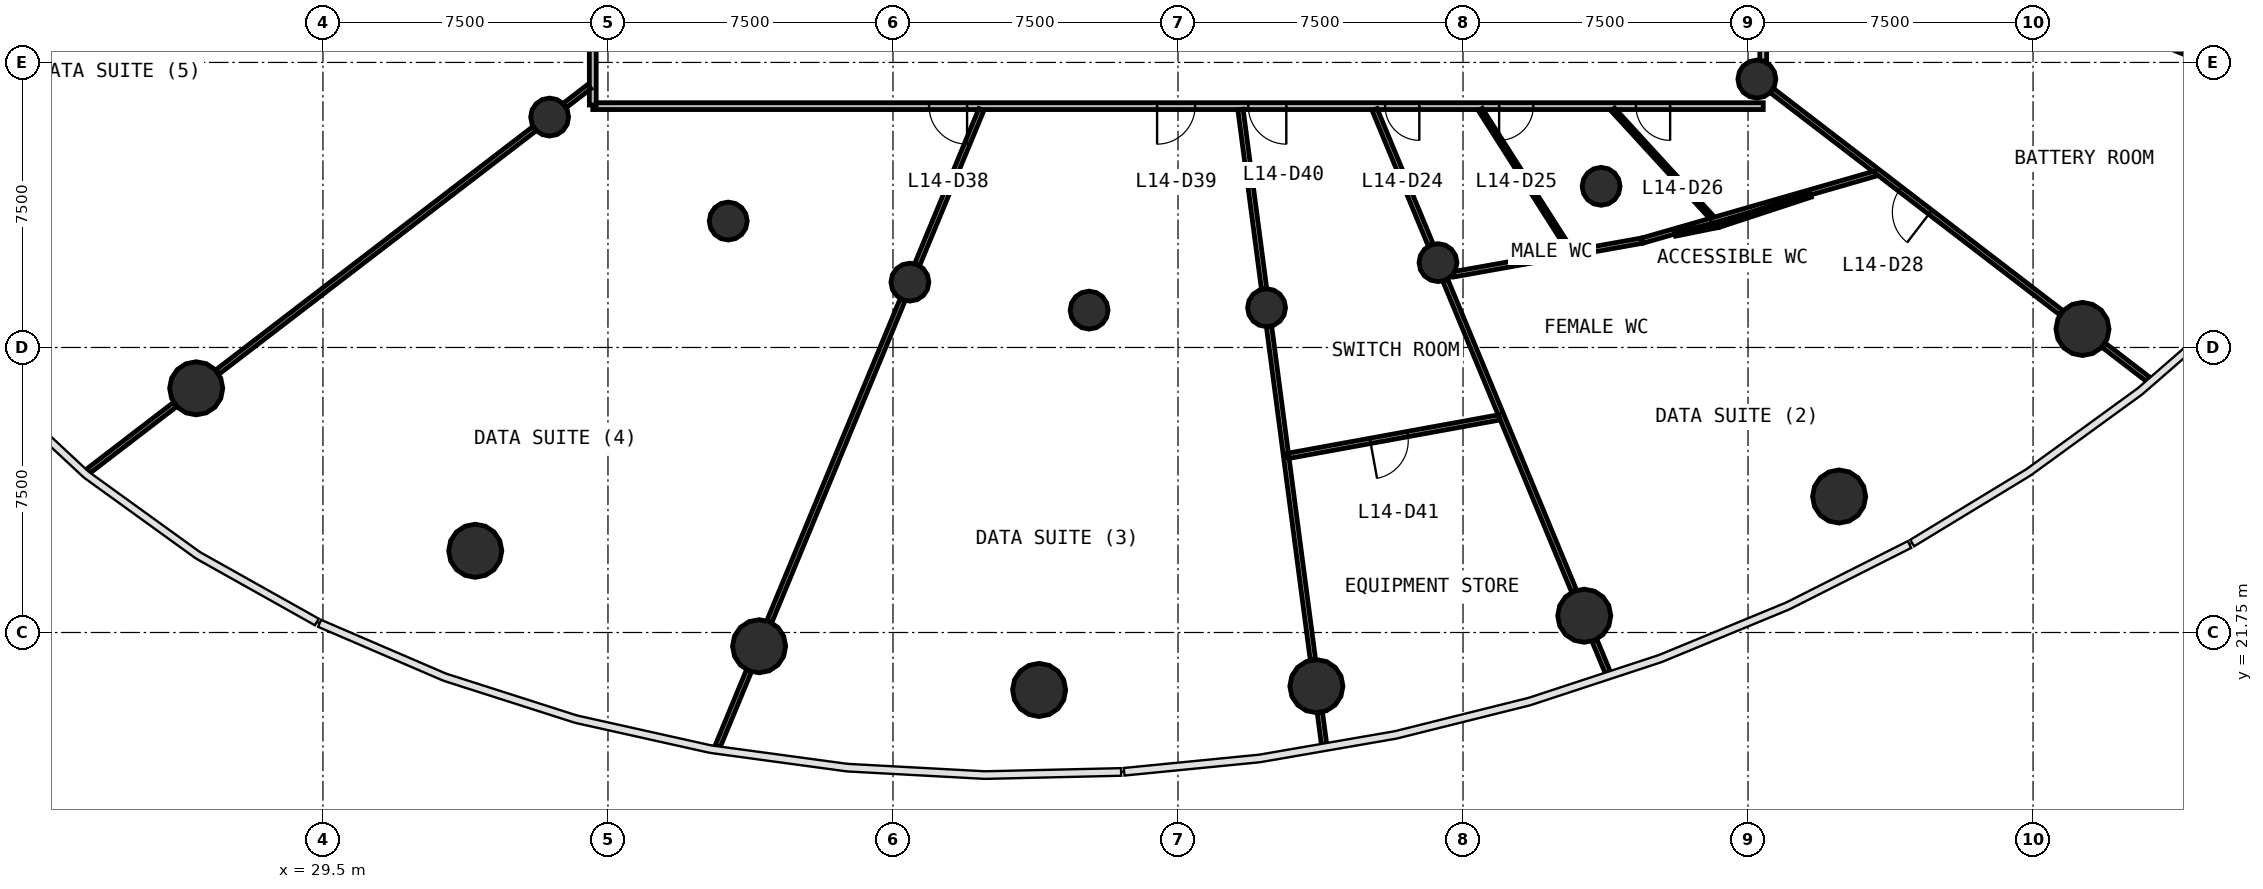
"""IFC4 building model, lengths in metres.
Left out: names, types, materials, properties, quantities, classifications, styles, units other than length and angle.
Written with IfcOpenShell. Run it as: python <this file> out.ifc"""

import sys

from ifc_helpers import new_model, si_unit, direction, frame, frame_2d, origin, origin_2d, place, context, subcontext, project, spatial, rectangle, circle, extrude, source, transform, mapped, element, fill, save


model = new_model("IFC4")
c1 = context("Model", 3, precision=1e-05, world=origin(), true_north=direction((0.0, 1.0)))
c2 = subcontext(c1, "Body", "Model", "MODEL_VIEW")
j1 = project(units=[si_unit("LENGTHUNIT", "METRE"), si_unit("PLANEANGLEUNIT", "RADIAN")], contexts=[c1])
p1 = place(None, origin())
s1 = spatial("IfcSite", under=j1, at=p1, CompositionType="ELEMENT")
p2 = place(p1, origin())
s2 = spatial("IfcBuilding", under=s1, at=p2, CompositionType="ELEMENT")
p3 = place(p2, frame((0.0, 0.0, 62.2)))
s3 = spatial("IfcBuildingStorey", under=s2, at=p3, CompositionType="ELEMENT", Elevation=62.2)
m1 = source(origin(), c2, "Body", "SweptSolid", [
    extrude(circle(Radius=0.7, at=origin_2d()), origin(), (0.0, 0.0, 1.0), 4.4),
])
for number, where, z_axis, x_axis in (
    (1, (26.164, 28.176, 0.0), (0.0, 0.0, 1.0), (1.0, 0.0, 0.0)),
    (2, (33.508, 23.9, 0.0), (0.0, 0.0, 1.0), (1.0, 0.0, 0.0)),
    (3, (40.977, 21.389, 0.0), (0.0, 0.0, 1.0), (1.0, 0.0, 0.0)),
    (4, (48.345, 20.239, 0.0), (0.0, 0.0, 1.0), (1.0, 0.0, 0.0)),
    (5, (55.642, 20.339, 0.0), (0.0, 0.0, 1.0), (1.0, 0.0, 0.0)),
    (6, (62.69, 22.191, 0.0), (0.0, 0.0, 1.0), (1.0, 0.0, 0.0)),
    (7, (69.396, 25.328, 0.0), (0.0, 0.0, 1.0), (1.0, 0.0, 0.0)),
    (8, (75.801, 29.737, 0.0), (0.0, 0.0, 1.0), (1.0, 0.0, 0.0)),
):
    element("IfcColumn", number, at=place(p3, frame(where, z_axis=z_axis, x_axis=x_axis)), inside=s3, PredefinedType="COLUMN", context=c2, shape_type="MappedRepresentation", body=[
        mapped(m1, transform((0.0, 0.0, 0.0), scale=1.0)),
    ])
m2 = source(origin(), c2, "Body", "SweptSolid", [
    extrude(circle(Radius=0.5, at=origin_2d()), origin(), (0.0, 0.0, 1.0), 4.4),
])
for number, where, z_axis, x_axis in (
    (9, (35.465, 35.312, 0.0), (0.0, 0.0, 1.0), (1.0, 0.0, 0.0)),
    (10, (40.165, 32.576, 0.0), (0.0, 0.0, 1.0), (1.0, 0.0, 0.0)),
    (11, (44.945, 30.969, 0.0), (0.0, 0.0, 1.0), (1.0, 0.0, 0.0)),
    (12, (49.661, 30.233, 0.0), (0.0, 0.0, 1.0), (1.0, 0.0, 0.0)),
    (13, (54.331, 30.297, 0.0), (0.0, 0.0, 1.0), (1.0, 0.0, 0.0)),
    (14, (58.842, 31.482, 0.0), (0.0, 0.0, 1.0), (1.0, 0.0, 0.0)),
    (15, (63.134, 33.49, 0.0), (0.0, 0.0, 1.0), (1.0, 0.0, 0.0)),
    (16, (67.232, 36.312, 0.0), (0.0, 0.0, 1.0), (1.0, 0.0, 0.0)),
):
    element("IfcColumn", number, at=place(p3, frame(where, z_axis=z_axis, x_axis=x_axis)), inside=s3, PredefinedType="COLUMN", context=c2, shape_type="MappedRepresentation", body=[
        mapped(m2, transform((0.0, 0.0, 0.0), scale=1.0)),
    ])
p4 = place(p3, frame((67.4, 35.6, 0.0), z_axis=(0.0, 0.0, 1.0), x_axis=(-1.0, 0.0, 0.0)))
e17 = element("IfcWall", 17, at=p4, inside=s3, PredefinedType="PARTITIONING", context=c2, shape_type="SweptSolid", body=[
    extrude(rectangle(XDim=30.8, YDim=0.18, at=frame_2d((15.4, 0.0))), origin(), (0.0, 0.0, 1.0), 3.05),
])
p5 = place(p4, frame((9.05, 0.0, 0.0)))
e18 = element("IfcOpeningElement", 18, at=p5, cuts=e17, PredefinedType="OPENING", context=c2, shape_type="SweptSolid", body=[
    extrude(rectangle(XDim=0.9, YDim=2.1, at=frame_2d((0.45, 1.05))), frame((0.0, 0.1, 0.0), z_axis=(0.0, -1.0, 0.0), x_axis=(1.0, 0.0, 0.0)), (0.0, 0.0, 1.0), 0.2),
])
p6 = place(p4, frame((6.05, 0.0, 0.0)))
e19 = element("IfcOpeningElement", 19, at=p6, cuts=e17, PredefinedType="OPENING", context=c2, shape_type="SweptSolid", body=[
    extrude(rectangle(XDim=0.9, YDim=2.1, at=frame_2d((0.45, 1.05))), frame((0.0, 0.1, 0.0), z_axis=(0.0, -1.0, 0.0), x_axis=(1.0, 0.0, 0.0)), (0.0, 0.0, 1.0), 0.2),
])
p7 = place(p4, frame((2.45, 0.0, 0.0)))
e20 = element("IfcOpeningElement", 20, at=p7, cuts=e17, PredefinedType="OPENING", context=c2, shape_type="SweptSolid", body=[
    extrude(rectangle(XDim=0.9, YDim=2.1, at=frame_2d((0.45, 1.05))), frame((0.0, 0.1, 0.0), z_axis=(0.0, -1.0, 0.0), x_axis=(1.0, 0.0, 0.0)), (0.0, 0.0, 1.0), 0.2),
])
p8 = place(p4, frame((20.95, 0.0, 0.0)))
e21 = element("IfcOpeningElement", 21, at=p8, cuts=e17, PredefinedType="OPENING", context=c2, shape_type="SweptSolid", body=[
    extrude(rectangle(XDim=1.0, YDim=2.1, at=frame_2d((0.5, 1.05))), frame((0.0, 0.1, 0.0), z_axis=(0.0, -1.0, 0.0), x_axis=(1.0, 0.0, 0.0)), (0.0, 0.0, 1.0), 0.2),
])
p9 = place(p4, frame((14.95, 0.0, 0.0)))
e22 = element("IfcOpeningElement", 22, at=p9, cuts=e17, PredefinedType="OPENING", context=c2, shape_type="SweptSolid", body=[
    extrude(rectangle(XDim=1.0, YDim=2.1, at=frame_2d((0.5, 1.05))), frame((0.0, 0.1, 0.0), z_axis=(0.0, -1.0, 0.0), x_axis=(1.0, 0.0, 0.0)), (0.0, 0.0, 1.0), 0.2),
])
p10 = place(p4, frame((12.55, 0.0, 0.0)))
e23 = element("IfcOpeningElement", 23, at=p10, cuts=e17, PredefinedType="OPENING", context=c2, shape_type="SweptSolid", body=[
    extrude(rectangle(XDim=1.0, YDim=2.1, at=frame_2d((0.5, 1.05))), frame((0.0, 0.1, 0.0), z_axis=(0.0, -1.0, 0.0), x_axis=(1.0, 0.0, 0.0)), (0.0, 0.0, 1.0), 0.2),
])
p11 = place(p3, frame((67.4, 60.37, 0.0), z_axis=(0.0, 0.0, 1.0), x_axis=(0.0, -1.0, 0.0)))
e24 = element("IfcWall", 24, at=p11, inside=s3, PredefinedType="PARTITIONING", context=c2, shape_type="SweptSolid", body=[
    extrude(rectangle(XDim=23.583, YDim=0.18, at=frame_2d((11.791, 0.0))), origin(), (0.0, 0.0, 1.0), 3.05),
])
p12 = place(p11, frame((19.133, 0.0, 0.0)))
e25 = element("IfcOpeningElement", 25, at=p12, cuts=e24, PredefinedType="OPENING", context=c2, shape_type="SweptSolid", body=[
    extrude(rectangle(XDim=1.0, YDim=2.1, at=frame_2d((0.5, 1.05))), frame((0.0, 0.1, 0.0), z_axis=(0.0, -1.0, 0.0), x_axis=(1.0, 0.0, 0.0)), (0.0, 0.0, 1.0), 0.2),
])
p13 = place(p11, frame((11.333, 0.0, 0.0)))
e26 = element("IfcOpeningElement", 26, at=p13, cuts=e24, PredefinedType="OPENING", context=c2, shape_type="SweptSolid", body=[
    extrude(rectangle(XDim=1.0, YDim=2.1, at=frame_2d((0.5, 1.05))), frame((0.0, 0.1, 0.0), z_axis=(0.0, -1.0, 0.0), x_axis=(1.0, 0.0, 0.0)), (0.0, 0.0, 1.0), 0.2),
])
p14 = place(p3, frame((36.6, 35.63, 0.0), z_axis=(0.0, 0.0, 1.0), x_axis=(0.0, 1.0, 0.0)))
e27 = element("IfcWall", 27, at=p14, inside=s3, PredefinedType="PARTITIONING", context=c2, shape_type="SweptSolid", body=[
    extrude(rectangle(XDim=23.583, YDim=0.18, at=frame_2d((11.791, 0.0))), origin(), (0.0, 0.0, 1.0), 3.05),
])
p15 = place(p14, frame((14.732, 0.0, 0.0)))
e28 = element("IfcOpeningElement", 28, at=p15, cuts=e27, PredefinedType="OPENING", context=c2, shape_type="SweptSolid", body=[
    extrude(rectangle(XDim=1.0, YDim=2.1, at=frame_2d((0.5, 1.05))), frame((0.0, 0.1, 0.0), z_axis=(0.0, -1.0, 0.0), x_axis=(1.0, 0.0, 0.0)), (0.0, 0.0, 1.0), 0.2),
])
p16 = place(p14, frame((11.333, 0.0, 0.0)))
e29 = element("IfcOpeningElement", 29, at=p16, cuts=e27, PredefinedType="OPENING", context=c2, shape_type="SweptSolid", body=[
    extrude(rectangle(XDim=1.0, YDim=2.1, at=frame_2d((0.5, 1.05))), frame((0.0, 0.1, 0.0), z_axis=(0.0, -1.0, 0.0), x_axis=(1.0, 0.0, 0.0)), (0.0, 0.0, 1.0), 0.2),
])
p17 = place(p14, frame((9.133, 0.0, 0.0)))
e30 = element("IfcOpeningElement", 30, at=p17, cuts=e27, PredefinedType="OPENING", context=c2, shape_type="SweptSolid", body=[
    extrude(rectangle(XDim=1.0, YDim=2.1, at=frame_2d((0.5, 1.05))), frame((0.0, 0.1, 0.0), z_axis=(0.0, -1.0, 0.0), x_axis=(1.0, 0.0, 0.0)), (0.0, 0.0, 1.0), 0.2),
])
p18 = place(p3, frame((35.065, 35.005, 0.0), z_axis=(0.0, 0.0, 1.0), x_axis=(-0.793353660174, -0.608761012129, 0.0)))
e31 = element("IfcWall", 31, at=p18, inside=s3, PredefinedType="PARTITIONING", context=c2, shape_type="SweptSolid", body=[
    extrude(rectangle(XDim=10.515, YDim=0.14, at=frame_2d((5.257, 0.0))), origin(), (0.0, 0.0, 1.0), 3.05),
])
p19 = place(p3, frame((71.439, 39.948, 0.0), z_axis=(0.0, 0.0, 1.0), x_axis=(0.923874685699, -0.382695133396, 0.0)))
e32 = element("IfcWall", 32, at=p19, inside=s3, PredefinedType="PARTITIONING", context=c2, shape_type="SweptSolid", body=[
    extrude(rectangle(XDim=10.341, YDim=0.14, at=frame_2d((5.17, 0.0))), origin(), (0.0, 0.0, 1.0), 3.05),
])
p20 = place(p3, frame((75.242, 30.166, 0.0), z_axis=(0.0, 0.0, 1.0), x_axis=(-0.793366218398, 0.608744645566, 0.0)))
e33 = element("IfcWall", 33, at=p20, inside=s3, PredefinedType="PARTITIONING", context=c2, shape_type="SweptSolid", body=[
    extrude(rectangle(XDim=9.591, YDim=0.14, at=frame_2d((4.796, 0.0))), origin(), (0.0, 0.0, 1.0), 3.05),
])
p21 = place(p20, frame((4.341, 0.0, 0.0)))
e34 = element("IfcOpeningElement", 34, at=p21, cuts=e33, PredefinedType="OPENING", context=c2, shape_type="SweptSolid", body=[
    extrude(rectangle(XDim=1.0, YDim=2.1, at=frame_2d((0.5, 1.05))), frame((0.0, 0.08, 0.0), z_axis=(0.0, -1.0, 0.0), x_axis=(1.0, 0.0, 0.0)), (0.0, 0.0, 1.0), 0.16),
])
p22 = place(p3, frame((44.752, 30.502, 0.0), z_axis=(0.0, 0.0, 1.0), x_axis=(-0.382672728165, -0.923883966264, 0.0)))
e35 = element("IfcWall", 35, at=p22, inside=s3, PredefinedType="PARTITIONING", context=c2, shape_type="SweptSolid", body=[
    extrude(rectangle(XDim=9.16, YDim=0.14, at=frame_2d((4.58, 0.0))), origin(), (0.0, 0.0, 1.0), 3.05),
])
p23 = place(p3, frame((59.035, 31.016, 0.0), z_axis=(0.0, 0.0, 1.0), x_axis=(0.382692208588, -0.923875897232, 0.0)))
e36 = element("IfcWall", 36, at=p23, inside=s3, PredefinedType="PARTITIONING", context=c2, shape_type="SweptSolid", body=[
    extrude(rectangle(XDim=8.846, YDim=0.14, at=frame_2d((4.423, 0.0))), origin(), (0.0, 0.0, 1.0), 3.05),
])
p24 = place(p3, frame((64.228, 32.064, 0.0), z_axis=(0.0, 0.0, 1.0), x_axis=(0.961015140523, 0.276495749849, 0.0)))
e37 = element("IfcWall", 37, at=p24, inside=s3, PredefinedType="PARTITIONING", context=c2, shape_type="SweptSolid", body=[
    extrude(rectangle(XDim=6.376, YDim=0.14, at=frame_2d((3.188, 0.0))), origin(), (0.0, 0.0, 1.0), 3.05),
])
p25 = place(p3, frame((60.453, 27.41, 0.0), z_axis=(0.0, 0.0, 1.0), x_axis=(-0.983810919706, -0.179209581961, 0.0)))
e38 = element("IfcWall", 38, at=p25, inside=s3, PredefinedType="PARTITIONING", context=c2, shape_type="SweptSolid", body=[
    extrude(rectangle(XDim=5.7, YDim=0.14, at=frame_2d((2.85, 0.0))), origin(), (0.0, 0.0, 1.0), 3.05),
])
p26 = place(p25, frame((2.45, 0.0, 0.0)))
e39 = element("IfcOpeningElement", 39, at=p26, cuts=e38, PredefinedType="OPENING", context=c2, shape_type="SweptSolid", body=[
    extrude(rectangle(XDim=1.0, YDim=2.1, at=frame_2d((0.5, 1.05))), frame((0.0, 0.08, 0.0), z_axis=(0.0, -1.0, 0.0), x_axis=(1.0, 0.0, 0.0)), (0.0, 0.0, 1.0), 0.16),
])
p27 = place(p3, frame((54.849, 26.359, 0.0), z_axis=(0.0, 0.0, 1.0), x_axis=(0.130530984963, -0.991444230385, 0.0)))
e40 = element("IfcWall", 40, at=p27, inside=s3, PredefinedType="PARTITIONING", context=c2, shape_type="SweptSolid", body=[
    extrude(rectangle(XDim=5.368, YDim=0.14, at=frame_2d((2.684, 0.0))), origin(), (0.0, 0.0, 1.0), 3.05),
])
p28 = place(p3, frame((59.24, 31.173, 0.0), z_axis=(0.0, 0.0, 1.0), x_axis=(0.984405997554, 0.1759114322, 0.0)))
e41 = element("IfcWall", 41, at=p28, inside=s3, PredefinedType="PARTITIONING", context=c2, shape_type="SweptSolid", body=[
    extrude(rectangle(XDim=5.037, YDim=0.14, at=frame_2d((2.518, 0.0))), origin(), (0.0, 0.0, 1.0), 3.05),
])
p29 = place(p3, frame((53.644, 35.51, 0.0), z_axis=(0.0, 0.0, 1.0), x_axis=(0.130548834981, -0.991441880135, 0.0)))
e42 = element("IfcWall", 42, at=p29, inside=s3, PredefinedType="PARTITIONING", context=c2, shape_type="SweptSolid", body=[
    extrude(rectangle(XDim=4.754, YDim=0.14, at=frame_2d((2.377, 0.0))), origin(), (0.0, 0.0, 1.0), 3.05),
])
p30 = place(p3, frame((46.826, 35.51, 0.0), z_axis=(0.0, 0.0, 1.0), x_axis=(-0.382672831764, -0.923883923353, 0.0)))
e43 = element("IfcWall", 43, at=p30, inside=s3, PredefinedType="PARTITIONING", context=c2, shape_type="SweptSolid", body=[
    extrude(rectangle(XDim=4.41, YDim=0.14, at=frame_2d((2.205, 0.0))), origin(), (0.0, 0.0, 1.0), 3.05),
])
p31 = place(p3, frame((57.174, 35.51, 0.0), z_axis=(0.0, 0.0, 1.0), x_axis=(0.382644558062, -0.923895633817, 0.0)))
e44 = element("IfcWall", 44, at=p31, inside=s3, PredefinedType="PARTITIONING", context=c2, shape_type="SweptSolid", body=[
    extrude(rectangle(XDim=3.854, YDim=0.14, at=frame_2d((1.927, 0.0))), origin(), (0.0, 0.0, 1.0), 3.05),
])
p32 = place(p3, frame((54.396, 29.797, 0.0), z_axis=(0.0, 0.0, 1.0), x_axis=(0.130501398564, -0.991448125205, 0.0)))
e45 = element("IfcWall", 45, at=p32, inside=s3, PredefinedType="PARTITIONING", context=c2, shape_type="SweptSolid", body=[
    extrude(rectangle(XDim=3.367, YDim=0.14, at=frame_2d((1.684, 0.0))), origin(), (0.0, 0.0, 1.0), 3.05),
])
p33 = place(p3, frame((25.606, 27.747, 0.0), z_axis=(0.0, 0.0, 1.0), x_axis=(-0.793354252031, -0.608760240804, 0.0)))
e46 = element("IfcWall", 46, at=p33, inside=s3, PredefinedType="PARTITIONING", context=c2, shape_type="SweptSolid", body=[
    extrude(rectangle(XDim=2.869, YDim=0.14, at=frame_2d((1.434, 0.0))), origin(), (0.0, 0.0, 1.0), 3.05),
])
p34 = place(p3, frame((40.708, 20.737, 0.0), z_axis=(0.0, 0.0, 1.0), x_axis=(-0.382791800522, -0.923834637504, 0.0)))
e47 = element("IfcWall", 47, at=p34, inside=s3, PredefinedType="PARTITIONING", context=c2, shape_type="SweptSolid", body=[
    extrude(rectangle(XDim=2.14, YDim=0.14, at=frame_2d((1.07, 0.0))), origin(), (0.0, 0.0, 1.0), 3.05),
])
p35 = place(p3, frame((76.359, 29.309, 0.0), z_axis=(0.0, 0.0, 1.0), x_axis=(0.793275855942, -0.608862395274, 0.0)))
e48 = element("IfcWall", 48, at=p35, inside=s3, PredefinedType="PARTITIONING", context=c2, shape_type="SweptSolid", body=[
    extrude(rectangle(XDim=1.475, YDim=0.14, at=frame_2d((0.737, 0.0))), origin(), (0.0, 0.0, 1.0), 3.05),
])
p36 = place(p3, frame((36.51, 36.114, 0.0), z_axis=(0.0, 0.0, 1.0), x_axis=(-0.793316076519, -0.608809989025, 0.0)))
e49 = element("IfcWall", 49, at=p36, inside=s3, PredefinedType="PARTITIONING", context=c2, shape_type="SweptSolid", body=[
    extrude(rectangle(XDim=0.812, YDim=0.14, at=frame_2d((0.406, 0.0))), origin(), (0.0, 0.0, 1.0), 3.05),
])
p37 = place(p3, frame((62.96, 21.54, 0.0), z_axis=(0.0, 0.0, 1.0), x_axis=(0.382532297319, -0.923942120215, 0.0)))
e50 = element("IfcWall", 50, at=p37, inside=s3, PredefinedType="PARTITIONING", context=c2, shape_type="SweptSolid", body=[
    extrude(rectangle(XDim=0.916, YDim=0.14, at=frame_2d((0.458, 0.0))), origin(), (0.0, 0.0, 1.0), 3.05),
])
p38 = place(p3, frame((55.734, 19.64, 0.0), z_axis=(0.0, 0.0, 1.0), x_axis=(0.130582405154, -0.991437459179, 0.0)))
e51 = element("IfcWall", 51, at=p38, inside=s3, PredefinedType="PARTITIONING", context=c2, shape_type="SweptSolid", body=[
    extrude(rectangle(XDim=0.839, YDim=0.14, at=frame_2d((0.42, 0.0))), origin(), (0.0, 0.0, 1.0), 3.05),
])
p39 = place(p3, frame((59.957, 35.51, 0.0), z_axis=(0.0, 0.0, 1.0), x_axis=(0.537273543242, -0.84340805055, 0.0)))
e52 = element("IfcWall", 52, at=p39, inside=s3, PredefinedType="PARTITIONING", context=c2, shape_type="SweptSolid", body=[
    extrude(rectangle(XDim=4.405, YDim=0.12, at=frame_2d((2.202, 0.0))), origin(), (0.0, 0.0, 1.0), 3.05),
])
p40 = place(p3, frame((66.231, 32.47, 0.0), z_axis=(0.0, 0.0, 1.0), x_axis=(0.950105410071, 0.311929013967, 0.0)))
e53 = element("IfcWall", 53, at=p40, inside=s3, PredefinedType="PARTITIONING", context=c2, shape_type="SweptSolid", body=[
    extrude(rectangle(XDim=2.541, YDim=0.12, at=frame_2d((1.27, 0.0))), origin(), (0.0, 0.0, 1.0), 3.05),
])
p41 = place(p3, frame((63.445, 35.51, 0.0), z_axis=(0.0, 0.0, 1.0), x_axis=(0.675584349377, -0.737282704854, 0.0)))
e54 = element("IfcWall", 54, at=p41, inside=s3, PredefinedType="PARTITIONING", context=c2, shape_type="SweptSolid", body=[
    extrude(rectangle(XDim=3.862, YDim=0.12, at=frame_2d((1.931, 0.0))), origin(), (0.0, 0.0, 1.0), 3.05),
])
p42 = place(p3, frame((65.082, 32.237, 0.0), z_axis=(0.0, 0.0, 1.0), x_axis=(0.980134277469, 0.198335065306, 0.0)))
e55 = element("IfcWall", 55, at=p42, inside=s3, PredefinedType="PARTITIONING", context=c2, shape_type="SweptSolid", body=[
    extrude(rectangle(XDim=1.142, YDim=0.12, at=frame_2d((0.571, 0.0))), origin(), (0.0, 0.0, 1.0), 3.05),
])
m3 = source(origin(), c2, "Body", "SweptSolid", [
    extrude(rectangle(XDim=0.9, YDim=2.1, at=frame_2d((0.45, 1.05))), frame((0.0, 0.025, 0.0), z_axis=(0.0, -1.0, 0.0), x_axis=(1.0, 0.0, 0.0)), (0.0, 0.0, 1.0), 0.05),
])
p43 = place(p5, origin())
e56 = element("IfcDoor", 56, at=p43, inside=s3, OperationType="SINGLE_SWING_LEFT", PredefinedType="DOOR", context=c2, shape_type="MappedRepresentation", body=[
    mapped(m3, transform((0.0, 0.0, 0.0), scale=1.0)),
])
fill(e18, e56)
p44 = place(p6, origin())
e57 = element("IfcDoor", 57, at=p44, inside=s3, OperationType="SINGLE_SWING_RIGHT", PredefinedType="DOOR", context=c2, shape_type="MappedRepresentation", body=[
    mapped(m3, transform((0.0, 0.0, 0.0), scale=1.0)),
])
fill(e19, e57)
p45 = place(p7, origin())
e58 = element("IfcDoor", 58, at=p45, inside=s3, OperationType="SINGLE_SWING_LEFT", PredefinedType="DOOR", context=c2, shape_type="MappedRepresentation", body=[
    mapped(m3, transform((0.0, 0.0, 0.0), scale=1.0)),
])
fill(e20, e58)
m4 = source(origin(), c2, "Body", "SweptSolid", [
    extrude(rectangle(XDim=1.0, YDim=2.1, at=frame_2d((0.5, 1.05))), frame((0.0, 0.025, 0.0), z_axis=(0.0, -1.0, 0.0), x_axis=(1.0, 0.0, 0.0)), (0.0, 0.0, 1.0), 0.05),
])
p46 = place(p21, origin())
e59 = element("IfcDoor", 59, at=p46, inside=s3, OperationType="SINGLE_SWING_LEFT", PredefinedType="DOOR", context=c2, shape_type="MappedRepresentation", body=[
    mapped(m4, transform((0.0, 0.0, 0.0), scale=1.0)),
])
fill(e34, e59)
p47 = place(p8, origin())
e60 = element("IfcDoor", 60, at=p47, inside=s3, OperationType="SINGLE_SWING_LEFT", PredefinedType="DOOR", context=c2, shape_type="MappedRepresentation", body=[
    mapped(m4, transform((0.0, 0.0, 0.0), scale=1.0)),
])
fill(e21, e60)
p48 = place(p9, origin())
e61 = element("IfcDoor", 61, at=p48, inside=s3, OperationType="SINGLE_SWING_RIGHT", PredefinedType="DOOR", context=c2, shape_type="MappedRepresentation", body=[
    mapped(m4, transform((0.0, 0.0, 0.0), scale=1.0)),
])
fill(e22, e61)
p49 = place(p10, origin())
e62 = element("IfcDoor", 62, at=p49, inside=s3, OperationType="SINGLE_SWING_LEFT", PredefinedType="DOOR", context=c2, shape_type="MappedRepresentation", body=[
    mapped(m4, transform((0.0, 0.0, 0.0), scale=1.0)),
])
fill(e23, e62)
p50 = place(p26, origin())
e63 = element("IfcDoor", 63, at=p50, inside=s3, OperationType="SINGLE_SWING_RIGHT", PredefinedType="DOOR", context=c2, shape_type="MappedRepresentation", body=[
    mapped(m4, transform((0.0, 0.0, 0.0), scale=1.0)),
])
fill(e39, e63)
save(model, sys.argv[1])
